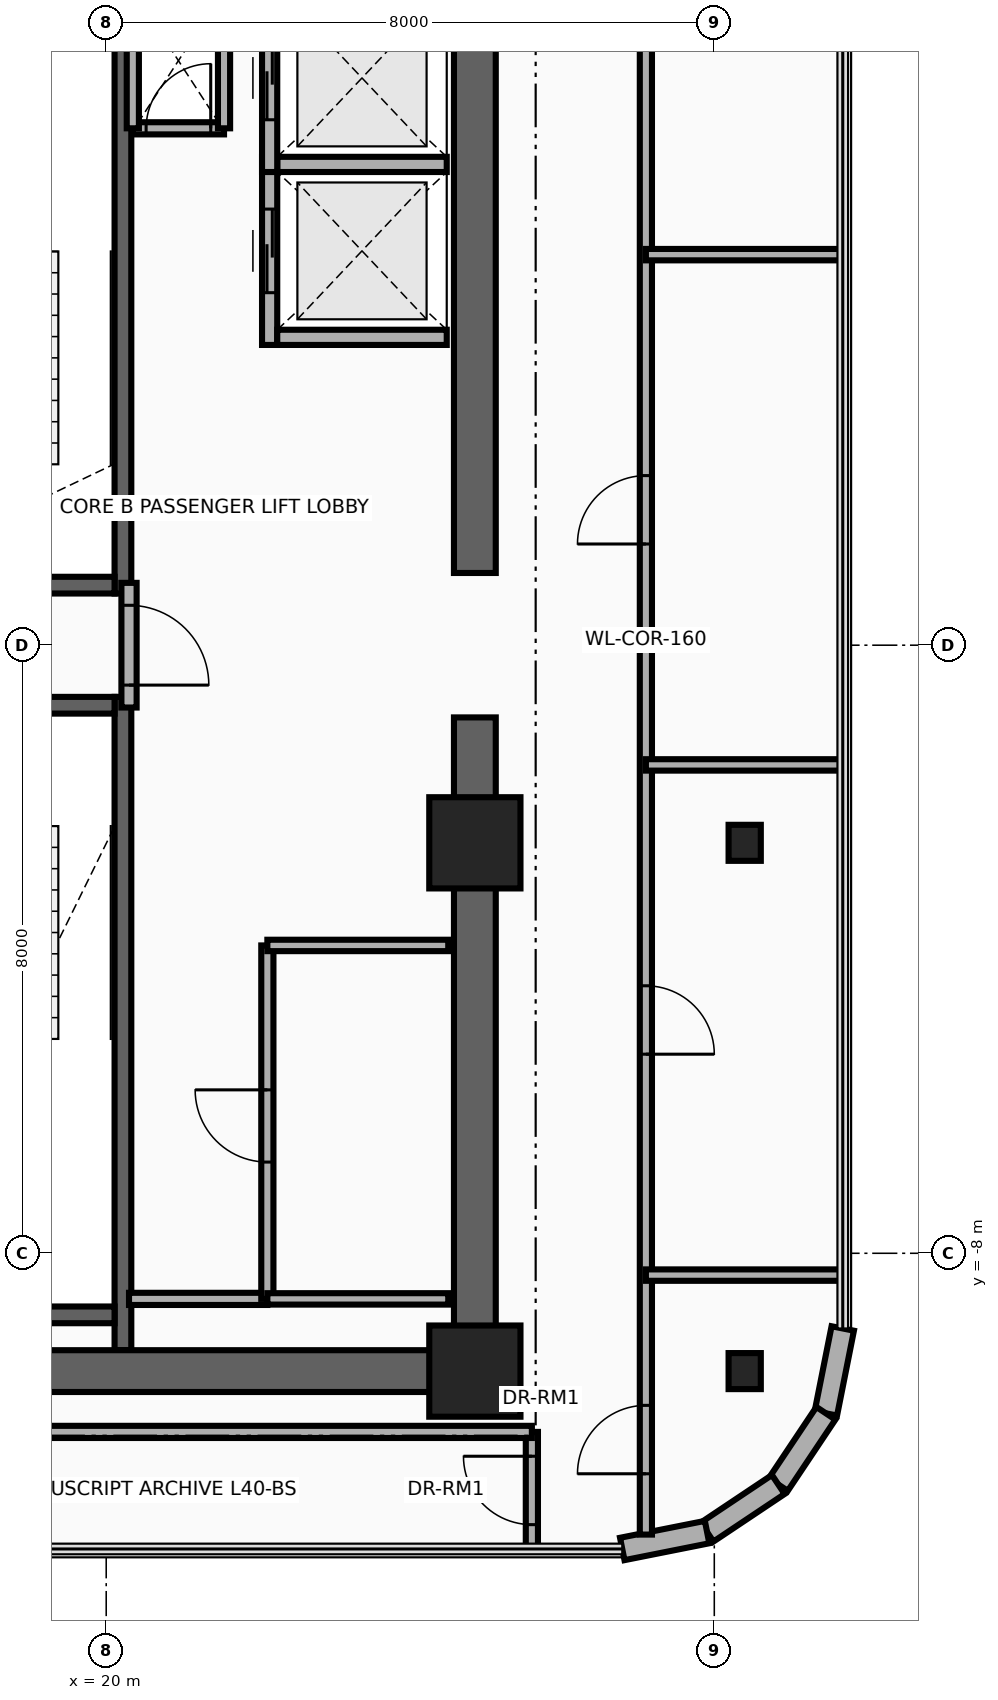
"""IFC4 building model, lengths in metres.
Left out: names, types, materials, properties, quantities, classifications, styles, units other than length and angle.
Written with IfcOpenShell. Run it as: python <this file> out.ifc"""

import sys

from ifc_helpers import new_model, si_unit, direction, frame, frame_2d, origin, origin_2d, place, context, subcontext, project, spatial, rectangle, i_section, extrude, source, transform, mapped, element, fill, save


model = new_model("IFC4")
c1 = context("Model", 3, precision=1e-05, world=origin(), true_north=direction((0.0, 1.0)))
c2 = subcontext(c1, "Body", "Model", "MODEL_VIEW")
j1 = project(units=[si_unit("LENGTHUNIT", "METRE"), si_unit("PLANEANGLEUNIT", "RADIAN")], contexts=[c1])
p1 = place(None, origin())
s1 = spatial("IfcSite", under=j1, at=p1, CompositionType="ELEMENT")
p2 = place(p1, origin())
s2 = spatial("IfcBuilding", under=s1, at=p2, CompositionType="ELEMENT")
p3 = place(p2, frame((0.0, 0.0, 157.5)))
s3 = spatial("IfcBuildingStorey", under=s2, at=p3, CompositionType="ELEMENT", Elevation=157.5)
p4 = place(p3, frame((20.22, 0.68, 0.0), z_axis=(0.0, 0.0, 1.0), x_axis=(0.0, 1.0, 0.0)))
e1 = element("IfcWall", 1, at=p4, inside=s3, PredefinedType="SHEAR", context=c2, shape_type="SweptSolid", body=[
    extrude(rectangle(XDim=8.595, YDim=0.22, at=frame_2d((4.297, 0.0))), origin(), (0.0, 0.0, 1.0), 3.46),
])
p5 = place(p3, frame((17.0, 0.79, 0.0), z_axis=(0.0, 0.0, 1.0), x_axis=(1.0, 0.0, 0.0)))
e2 = element("IfcWall", 2, at=p5, inside=s3, PredefinedType="SHEAR", context=c2, shape_type="SweptSolid", body=[
    extrude(rectangle(XDim=3.11, YDim=0.22, at=frame_2d((1.555, 0.0))), origin(), (0.0, 0.0, 1.0), 3.46),
])
p6 = place(p5, frame((0.95, 0.0, 0.0)))
e3 = element("IfcOpeningElement", 3, at=p6, cuts=e2, PredefinedType="OPENING", context=c2, shape_type="SweptSolid", body=[
    extrude(rectangle(XDim=1.1, YDim=2.15, at=frame_2d((0.55, 1.075))), frame((0.0, 0.125, 0.0), z_axis=(0.0, -1.0, 0.0), x_axis=(1.0, 0.0, 0.0)), (0.0, 0.0, 1.0), 0.25),
])
p7 = place(p3, frame((20.22, -9.275, 0.0), z_axis=(0.0, 0.0, 1.0), x_axis=(0.0, 1.0, 0.0)))
e4 = element("IfcWall", 4, at=p7, inside=s3, PredefinedType="SHEAR", context=c2, shape_type="SweptSolid", body=[
    extrude(rectangle(XDim=8.595, YDim=0.22, at=frame_2d((4.297, 0.0))), origin(), (0.0, 0.0, 1.0), 3.46),
])
p8 = place(p3, frame((17.0, -8.81, 0.0), z_axis=(0.0, 0.0, 1.0), x_axis=(1.0, 0.0, 0.0)))
e5 = element("IfcWall", 5, at=p8, inside=s3, PredefinedType="SHEAR", context=c2, shape_type="SweptSolid", body=[
    extrude(rectangle(XDim=3.11, YDim=0.22, at=frame_2d((1.555, 0.0))), origin(), (0.0, 0.0, 1.0), 3.46),
])
p9 = place(p3, frame((17.0, -0.79, 0.0), z_axis=(0.0, 0.0, 1.0), x_axis=(1.0, 0.0, 0.0)))
e6 = element("IfcWall", 6, at=p9, inside=s3, PredefinedType="SHEAR", context=c2, shape_type="SweptSolid", body=[
    extrude(rectangle(XDim=3.11, YDim=0.22, at=frame_2d((1.555, 0.0))), origin(), (0.0, 0.0, 1.0), 3.46),
])
p10 = place(p9, frame((0.95, 0.0, 0.0)))
e7 = element("IfcOpeningElement", 7, at=p10, cuts=e6, PredefinedType="OPENING", context=c2, shape_type="SweptSolid", body=[
    extrude(rectangle(XDim=1.1, YDim=2.15, at=frame_2d((0.55, 1.075))), frame((0.0, 0.125, 0.0), z_axis=(0.0, -1.0, 0.0), x_axis=(1.0, 0.0, 0.0)), (0.0, 0.0, 1.0), 0.25),
])
for number, where, z_axis, x_axis in (
    (8, (24.85, -9.825, 0.0), (0.0, 0.0, 1.0), (0.0, 1.0, 0.0)),
    (9, (24.85, 0.95, 0.0), (0.0, 0.0, 1.0), (0.0, 1.0, 0.0)),
):
    element("IfcWall", number, at=place(p3, frame(where, z_axis=z_axis, x_axis=x_axis)), inside=s3, PredefinedType="SHEAR", context=c2, shape_type="SweptSolid", body=[
        extrude(rectangle(XDim=8.875, YDim=0.55, at=frame_2d((4.438, 0.0))), origin(), (0.0, 0.0, 1.0), 3.46),
    ])
p11 = place(p3, frame((15.85, -9.55, 0.0), z_axis=(0.0, 0.0, 1.0), x_axis=(1.0, 0.0, 0.0)))
e10 = element("IfcWall", 10, at=p11, inside=s3, PredefinedType="SHEAR", context=c2, shape_type="SweptSolid", body=[
    extrude(rectangle(XDim=9.0, YDim=0.55, at=frame_2d((4.5, 0.0))), origin(), (0.0, 0.0, 1.0), 3.46),
])
m1 = source(origin(), c2, "Body", "SweptSolid", [
    extrude(rectangle(XDim=1.2, YDim=1.2, at=origin_2d()), origin(), (0.0, 0.0, 1.0), 3.7),
])
p12 = place(p3, frame((24.85, -9.55, 0.0), z_axis=(0.0, 0.0, 1.0), x_axis=(1.0, 0.0, 0.0)))
e11 = element("IfcColumn", 11, at=p12, inside=s3, PredefinedType="COLUMN", context=c2, shape_type="MappedRepresentation", body=[
    mapped(m1, transform((0.0, 0.0, 0.0), x_axis=(1.0, 0.0, 0.0), y_axis=(0.0, 1.0, 0.0), z_axis=(0.0, 0.0, 1.0), scale=1.0)),
])
m2 = source(origin(), c2, "Body", "SweptSolid", [
    extrude(i_section(OverallWidth=0.424, OverallDepth=0.474, WebThickness=0.048, FlangeThickness=0.077, at=origin_2d()), origin(), (0.0, 0.0, 1.0), 3.7),
])
p13 = place(p3, frame((28.4, -9.55, 0.0), z_axis=(0.0, 0.0, 1.0), x_axis=(1.0, 0.0, 0.0)))
e12 = element("IfcColumn", 12, at=p13, inside=s3, PredefinedType="COLUMN", context=c2, shape_type="MappedRepresentation", body=[
    mapped(m2, transform((0.0, 0.0, 0.0), x_axis=(1.0, 0.0, 0.0), y_axis=(0.0, 1.0, 0.0), z_axis=(0.0, 0.0, 1.0), scale=1.0)),
])
p14 = place(p3, frame((24.85, -2.6, 0.0), z_axis=(0.0, 0.0, 1.0), x_axis=(1.0, 0.0, 0.0)))
e13 = element("IfcColumn", 13, at=p14, inside=s3, PredefinedType="COLUMN", context=c2, shape_type="MappedRepresentation", body=[
    mapped(m1, transform((0.0, 0.0, 0.0), x_axis=(1.0, 0.0, 0.0), y_axis=(0.0, 1.0, 0.0), z_axis=(0.0, 0.0, 1.0), scale=1.0)),
])
p15 = place(p3, frame((28.4, -2.6, 0.0), z_axis=(0.0, 0.0, 1.0), x_axis=(1.0, 0.0, 0.0)))
e14 = element("IfcColumn", 14, at=p15, inside=s3, PredefinedType="COLUMN", context=c2, shape_type="MappedRepresentation", body=[
    mapped(m2, transform((0.0, 0.0, 0.0), x_axis=(1.0, 0.0, 0.0), y_axis=(0.0, 1.0, 0.0), z_axis=(0.0, 0.0, 1.0), scale=1.0)),
])
p16 = place(p3, frame((29.69, -8.989, 0.0), z_axis=(0.0, 0.0, 1.0), x_axis=(-0.195043173023, -0.980794657743, 0.0)))
e15 = element("IfcWall", 15, at=p16, inside=s3, PredefinedType="SOLIDWALL", context=c2, shape_type="SweptSolid", body=[
    extrude(rectangle(XDim=1.138, YDim=0.3, at=frame_2d((0.569, 0.0))), origin(), (0.0, 0.0, 1.0), 3.46),
])
for number, where, z_axis, x_axis in (
    (16, (29.468, -10.105, 0.0), (0.0, 0.0, 1.0), (-0.556, -0.831, 0.0)),
    (17, (28.842, -11.042, 0.0), (0.0, 0.0, 1.0), (-0.831, -0.556, 0.0)),
):
    element("IfcWall", number, at=place(p3, frame(where, z_axis=z_axis, x_axis=x_axis)), inside=s3, PredefinedType="SOLIDWALL", context=c2, shape_type="SweptSolid", body=[
        extrude(rectangle(XDim=1.127, YDim=0.3, at=frame_2d((0.563, 0.0))), origin(), (0.0, 0.0, 1.0), 3.46),
    ])
p17 = place(p3, frame((27.905, -11.668, 0.0), z_axis=(0.0, 0.0, 1.0), x_axis=(-0.980794657743, -0.195043173023, 0.0)))
e18 = element("IfcWall", 18, at=p17, inside=s3, PredefinedType="SOLIDWALL", context=c2, shape_type="SweptSolid", body=[
    extrude(rectangle(XDim=1.138, YDim=0.3, at=frame_2d((0.569, 0.0))), origin(), (0.0, 0.0, 1.0), 3.46),
])
p18 = place(p3, frame((22.15, 3.95, 0.0), z_axis=(0.0, 0.0, 1.0), x_axis=(0.0, 1.0, 0.0)))
e19 = element("IfcWall", 19, at=p18, inside=s3, PredefinedType="MOVABLE", context=c2, shape_type="SweptSolid", body=[
    extrude(rectangle(XDim=2.475, YDim=0.2, at=frame_2d((1.238, 0.0))), origin(), (0.0, 0.0, 1.0), 3.46),
])
p19 = place(p18, frame((0.688, 0.0, 0.0)))
e20 = element("IfcOpeningElement", 20, at=p19, cuts=e19, PredefinedType="OPENING", context=c2, shape_type="SweptSolid", body=[
    extrude(rectangle(XDim=1.1, YDim=2.1, at=frame_2d((0.55, 1.05))), frame((0.0, 0.115, 0.0), z_axis=(0.0, -1.0, 0.0), x_axis=(1.0, 0.0, 0.0)), (0.0, 0.0, 1.0), 0.23),
])
for number, where, z_axis, x_axis in (
    (21, (22.25, 4.05, 0.0), (0.0, 0.0, 1.0), (1.0, 0.0, 0.0)),
    (22, (22.25, 6.325, 0.0), (0.0, 0.0, 1.0), (1.0, 0.0, 0.0)),
):
    element("IfcWall", number, at=place(p3, frame(where, z_axis=z_axis, x_axis=x_axis)), inside=s3, PredefinedType="MOVABLE", context=c2, shape_type="SweptSolid", body=[
        extrude(rectangle(XDim=2.23, YDim=0.2, at=frame_2d((1.115, 0.0))), origin(), (0.0, 0.0, 1.0), 3.46),
    ])
p20 = place(p3, frame((22.15, 6.225, 0.0), z_axis=(0.0, 0.0, 1.0), x_axis=(0.0, 1.0, 0.0)))
e23 = element("IfcWall", 23, at=p20, inside=s3, PredefinedType="MOVABLE", context=c2, shape_type="SweptSolid", body=[
    extrude(rectangle(XDim=2.475, YDim=0.2, at=frame_2d((1.237, 0.0))), origin(), (0.0, 0.0, 1.0), 3.46),
])
p21 = place(p20, frame((0.688, 0.0, 0.0)))
e24 = element("IfcOpeningElement", 24, at=p21, cuts=e23, PredefinedType="OPENING", context=c2, shape_type="SweptSolid", body=[
    extrude(rectangle(XDim=1.1, YDim=2.1, at=frame_2d((0.55, 1.05))), frame((0.0, 0.115, 0.0), z_axis=(0.0, -1.0, 0.0), x_axis=(1.0, 0.0, 0.0)), (0.0, 0.0, 1.0), 0.23),
])
p22 = place(p3, frame((20.3, -0.82, 0.0), z_axis=(0.0, 0.0, 1.0), x_axis=(0.0, 1.0, 0.0)))
e25 = element("IfcWall", 25, at=p22, inside=s3, PredefinedType="PARTITIONING", context=c2, shape_type="SweptSolid", body=[
    extrude(rectangle(XDim=1.64, YDim=0.2, at=frame_2d((0.82, 0.0))), origin(), (0.0, 0.0, 1.0), 3.46),
])
p23 = place(p22, frame((0.295, 0.0, 0.0)))
e26 = element("IfcOpeningElement", 26, at=p23, cuts=e25, PredefinedType="OPENING", context=c2, shape_type="SweptSolid", body=[
    extrude(rectangle(XDim=1.05, YDim=2.15, at=frame_2d((0.525, 1.075))), frame((0.0, 0.115, 0.0), z_axis=(0.0, -1.0, 0.0), x_axis=(1.0, 0.0, 0.0)), (0.0, 0.0, 1.0), 0.23),
])
p24 = place(p3, frame((20.35, 6.8, 0.0), z_axis=(0.0, 0.0, 1.0), x_axis=(1.0, 0.0, 0.0)))
e27 = element("IfcWall", 27, at=p24, inside=s3, PredefinedType="PARTITIONING", context=c2, shape_type="SweptSolid", body=[
    extrude(rectangle(XDim=1.2, YDim=0.16, at=frame_2d((0.6, 0.0))), origin(), (0.0, 0.0, 1.0), 3.46),
])
p25 = place(p24, frame((0.175, 0.0, 0.0)))
e28 = element("IfcOpeningElement", 28, at=p25, cuts=e27, PredefinedType="OPENING", context=c2, shape_type="SweptSolid", body=[
    extrude(rectangle(XDim=0.85, YDim=2.05, at=frame_2d((0.425, 1.025))), frame((0.0, 0.095, 0.0), z_axis=(0.0, -1.0, 0.0), x_axis=(1.0, 0.0, 0.0)), (0.0, 0.0, 1.0), 0.19),
])
for number, where, z_axis, x_axis in (
    (29, (21.55, 6.8, 0.0), (0.0, 0.0, 1.0), (0.0, 1.0, 0.0)),
    (30, (20.35, 6.8, 0.0), (0.0, 0.0, 1.0), (0.0, 1.0, 0.0)),
):
    element("IfcWall", number, at=place(p3, frame(where, z_axis=z_axis, x_axis=x_axis)), inside=s3, PredefinedType="PARTITIONING", context=c2, shape_type="SweptSolid", body=[
        extrude(rectangle(XDim=1.8, YDim=0.16, at=frame_2d((0.9, 0.0))), origin(), (0.0, 0.0, 1.0), 3.46),
    ])
p26 = place(p3, frame((20.3, -8.6, 0.0), z_axis=(0.0, 0.0, 1.0), x_axis=(1.0, 0.0, 0.0)))
e31 = element("IfcWall", 31, at=p26, inside=s3, PredefinedType="PARTITIONING", context=c2, shape_type="SweptSolid", body=[
    extrude(rectangle(XDim=1.82, YDim=0.16, at=frame_2d((0.91, 0.0))), origin(), (0.0, 0.0, 1.0), 3.46),
])
p27 = place(p3, frame((22.12, -8.6, 0.0), z_axis=(0.0, 0.0, 1.0), x_axis=(0.0, 1.0, 0.0)))
e32 = element("IfcWall", 32, at=p27, inside=s3, PredefinedType="PARTITIONING", context=c2, shape_type="SweptSolid", body=[
    extrude(rectangle(XDim=4.65, YDim=0.16, at=frame_2d((2.325, 0.0))), origin(), (0.0, 0.0, 1.0), 3.46),
])
p28 = place(p27, frame((1.8, 0.0, 0.0)))
e33 = element("IfcOpeningElement", 33, at=p28, cuts=e32, PredefinedType="OPENING", context=c2, shape_type="SweptSolid", body=[
    extrude(rectangle(XDim=0.95, YDim=2.15, at=frame_2d((0.475, 1.075))), frame((0.0, 0.095, 0.0), z_axis=(0.0, -1.0, 0.0), x_axis=(1.0, 0.0, 0.0)), (0.0, 0.0, 1.0), 0.19),
])
for number, where, z_axis, x_axis in (
    (34, (22.12, -3.95, 0.0), (0.0, 0.0, 1.0), (1.0, 0.0, 0.0)),
    (35, (22.12, -8.6, 0.0), (0.0, 0.0, 1.0), (1.0, 0.0, 0.0)),
):
    element("IfcWall", number, at=place(p3, frame(where, z_axis=z_axis, x_axis=x_axis)), inside=s3, PredefinedType="PARTITIONING", context=c2, shape_type="SweptSolid", body=[
        extrude(rectangle(XDim=2.38, YDim=0.15, at=frame_2d((1.19, 0.0))), origin(), (0.0, 0.0, 1.0), 3.46),
    ])
p29 = place(p3, frame((25.6, -11.89, 0.0), z_axis=(0.0, 0.0, 1.0), x_axis=(0.0, 1.0, 0.0)))
e36 = element("IfcWall", 36, at=p29, inside=s3, PredefinedType="PARTITIONING", context=c2, shape_type="SweptSolid", body=[
    extrude(rectangle(XDim=1.54, YDim=0.16, at=frame_2d((0.77, 0.0))), origin(), (0.0, 0.0, 1.0), 3.46),
])
p30 = place(p29, frame((0.32, 0.0, 0.0)))
e37 = element("IfcOpeningElement", 37, at=p30, cuts=e36, PredefinedType="OPENING", context=c2, shape_type="SweptSolid", body=[
    extrude(rectangle(XDim=0.9, YDim=2.1, at=frame_2d((0.45, 1.05))), frame((0.0, 0.095, 0.0), z_axis=(0.0, -1.0, 0.0), x_axis=(1.0, 0.0, 0.0)), (0.0, 0.0, 1.0), 0.19),
])
p31 = place(p3, frame((14.146, -10.35, 0.0), z_axis=(0.0, 0.0, 1.0), x_axis=(1.0, 0.0, 0.0)))
e38 = element("IfcWall", 38, at=p31, inside=s3, PredefinedType="PARTITIONING", context=c2, shape_type="SweptSolid", body=[
    extrude(rectangle(XDim=11.454, YDim=0.16, at=frame_2d((5.727, 0.0))), origin(), (0.0, 0.0, 1.0), 3.46),
])
p32 = place(p3, frame((27.1, -11.701, 0.0), z_axis=(0.0, 0.0, 1.0), x_axis=(0.0, 1.0, 0.0)))
e39 = element("IfcWall", 39, at=p32, inside=s3, PredefinedType="PARTITIONING", context=c2, shape_type="SweptSolid", body=[
    extrude(rectangle(XDim=23.551, YDim=0.16, at=frame_2d((11.775, 0.0))), origin(), (0.0, 0.0, 1.0), 2.666),
])
p33 = place(p32, frame((0.8, 0.0, 0.0)))
e40 = element("IfcOpeningElement", 40, at=p33, cuts=e39, PredefinedType="OPENING", context=c2, shape_type="SweptSolid", body=[
    extrude(rectangle(XDim=0.9, YDim=2.1, at=frame_2d((0.45, 1.05))), frame((0.0, 0.095, 0.0), z_axis=(0.0, -1.0, 0.0), x_axis=(1.0, 0.0, 0.0)), (0.0, 0.0, 1.0), 0.19),
])
p34 = place(p32, frame((6.32, 0.0, 0.0)))
e41 = element("IfcOpeningElement", 41, at=p34, cuts=e39, PredefinedType="OPENING", context=c2, shape_type="SweptSolid", body=[
    extrude(rectangle(XDim=0.9, YDim=2.1, at=frame_2d((0.45, 1.05))), frame((0.0, 0.095, 0.0), z_axis=(0.0, -1.0, 0.0), x_axis=(1.0, 0.0, 0.0)), (0.0, 0.0, 1.0), 0.19),
])
p35 = place(p32, frame((13.032, 0.0, 0.0)))
e42 = element("IfcOpeningElement", 42, at=p35, cuts=e39, PredefinedType="OPENING", context=c2, shape_type="SweptSolid", body=[
    extrude(rectangle(XDim=0.9, YDim=2.1, at=frame_2d((0.45, 1.05))), frame((0.0, 0.095, 0.0), z_axis=(0.0, -1.0, 0.0), x_axis=(1.0, 0.0, 0.0)), (0.0, 0.0, 1.0), 0.19),
])
p36 = place(p32, frame((19.745, 0.0, 0.0)))
e43 = element("IfcOpeningElement", 43, at=p36, cuts=e39, PredefinedType="OPENING", context=c2, shape_type="SweptSolid", body=[
    extrude(rectangle(XDim=0.9, YDim=2.1, at=frame_2d((0.45, 1.05))), frame((0.0, 0.095, 0.0), z_axis=(0.0, -1.0, 0.0), x_axis=(1.0, 0.0, 0.0)), (0.0, 0.0, 1.0), 0.19),
])
for number, where, z_axis, x_axis in (
    (44, (27.1, -8.287, 0.0), (0.0, 0.0, 1.0), (1.0, 0.0, 0.0)),
    (45, (27.1, -1.575, 0.0), (0.0, 0.0, 1.0), (1.0, 0.0, 0.0)),
    (46, (27.1, 5.138, 0.0), (0.0, 0.0, 1.0), (1.0, 0.0, 0.0)),
):
    element("IfcWall", number, at=place(p3, frame(where, z_axis=z_axis, x_axis=x_axis)), inside=s3, PredefinedType="PARTITIONING", context=c2, shape_type="SweptSolid", body=[
        extrude(rectangle(XDim=2.59, YDim=0.15, at=frame_2d((1.295, 0.0))), origin(), (0.0, 0.0, 1.0), 2.896),
    ])
p37 = place(p19, origin())
e47 = element("IfcDoor", 47, at=p37, inside=s3, OperationType="DOUBLE_DOOR_SLIDING", PredefinedType="DOOR", context=c2, shape_type="SweptSolid", body=[
    extrude(rectangle(XDim=1.1, YDim=2.1, at=frame_2d((0.55, 1.05))), frame((0.0, 0.025, 0.0), z_axis=(0.0, -1.0, 0.0), x_axis=(1.0, 0.0, 0.0)), (0.0, 0.0, 1.0), 0.05),
])
fill(e20, e47)
p38 = place(p21, origin())
e48 = element("IfcDoor", 48, at=p38, inside=s3, OperationType="DOUBLE_DOOR_SLIDING", PredefinedType="DOOR", context=c2, shape_type="SweptSolid", body=[
    extrude(rectangle(XDim=1.1, YDim=2.1, at=frame_2d((0.55, 1.05))), frame((0.0, 0.025, 0.0), z_axis=(0.0, -1.0, 0.0), x_axis=(1.0, 0.0, 0.0)), (0.0, 0.0, 1.0), 0.05),
])
fill(e24, e48)
p39 = place(p23, frame((1.05, 0.0, 0.0), z_axis=(0.0, 0.0, 1.0), x_axis=(-1.0, 0.0, 0.0)))
e49 = element("IfcDoor", 49, at=p39, inside=s3, OperationType="SINGLE_SWING_LEFT", PredefinedType="DOOR", context=c2, shape_type="SweptSolid", body=[
    extrude(rectangle(XDim=1.05, YDim=2.15, at=frame_2d((0.525, 1.075))), frame((0.0, 0.025, 0.0), z_axis=(0.0, -1.0, 0.0), x_axis=(1.0, 0.0, 0.0)), (0.0, 0.0, 1.0), 0.05),
])
fill(e26, e49)
p40 = place(p25, origin())
e50 = element("IfcDoor", 50, at=p40, inside=s3, OperationType="SINGLE_SWING_RIGHT", PredefinedType="DOOR", context=c2, shape_type="SweptSolid", body=[
    extrude(rectangle(XDim=0.85, YDim=2.05, at=frame_2d((0.425, 1.025))), frame((0.0, 0.025, 0.0), z_axis=(0.0, -1.0, 0.0), x_axis=(1.0, 0.0, 0.0)), (0.0, 0.0, 1.0), 0.05),
])
fill(e28, e50)
p41 = place(p28, origin())
e51 = element("IfcDoor", 51, at=p41, inside=s3, OperationType="SINGLE_SWING_LEFT", PredefinedType="DOOR", context=c2, shape_type="SweptSolid", body=[
    extrude(rectangle(XDim=0.95, YDim=2.15, at=frame_2d((0.475, 1.075))), frame((0.0, 0.025, 0.0), z_axis=(0.0, -1.0, 0.0), x_axis=(1.0, 0.0, 0.0)), (0.0, 0.0, 1.0), 0.05),
])
fill(e33, e51)
p42 = place(p30, origin())
e52 = element("IfcDoor", 52, at=p42, inside=s3, OperationType="SINGLE_SWING_RIGHT", PredefinedType="DOOR", context=c2, shape_type="SweptSolid", body=[
    extrude(rectangle(XDim=0.9, YDim=2.1, at=frame_2d((0.45, 1.05))), frame((0.0, 0.025, 0.0), z_axis=(0.0, -1.0, 0.0), x_axis=(1.0, 0.0, 0.0)), (0.0, 0.0, 1.0), 0.05),
])
fill(e37, e52)
p43 = place(p33, origin())
e53 = element("IfcDoor", 53, at=p43, inside=s3, OperationType="SINGLE_SWING_RIGHT", PredefinedType="DOOR", context=c2, shape_type="SweptSolid", body=[
    extrude(rectangle(XDim=0.9, YDim=2.1, at=frame_2d((0.45, 1.05))), frame((0.0, 0.025, 0.0), z_axis=(0.0, -1.0, 0.0), x_axis=(1.0, 0.0, 0.0)), (0.0, 0.0, 1.0), 0.05),
])
fill(e40, e53)
p44 = place(p34, frame((0.9, 0.0, 0.0), z_axis=(0.0, 0.0, 1.0), x_axis=(-1.0, 0.0, 0.0)))
e54 = element("IfcDoor", 54, at=p44, inside=s3, OperationType="SINGLE_SWING_LEFT", PredefinedType="DOOR", context=c2, shape_type="SweptSolid", body=[
    extrude(rectangle(XDim=0.9, YDim=2.1, at=frame_2d((0.45, 1.05))), frame((0.0, 0.025, 0.0), z_axis=(0.0, -1.0, 0.0), x_axis=(1.0, 0.0, 0.0)), (0.0, 0.0, 1.0), 0.05),
])
fill(e41, e54)
p45 = place(p35, origin())
e55 = element("IfcDoor", 55, at=p45, inside=s3, OperationType="SINGLE_SWING_RIGHT", PredefinedType="DOOR", context=c2, shape_type="SweptSolid", body=[
    extrude(rectangle(XDim=0.9, YDim=2.1, at=frame_2d((0.45, 1.05))), frame((0.0, 0.025, 0.0), z_axis=(0.0, -1.0, 0.0), x_axis=(1.0, 0.0, 0.0)), (0.0, 0.0, 1.0), 0.05),
])
fill(e42, e55)
save(model, sys.argv[1])
